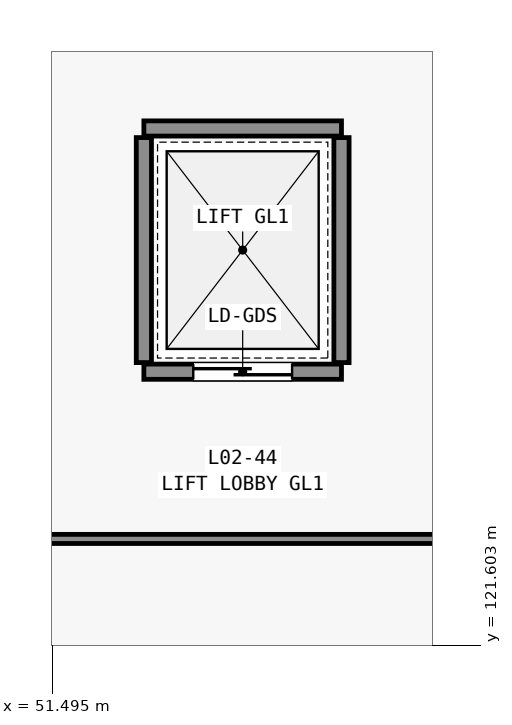
"""IFC4 building model, lengths in metres.
Left out: names, types, materials, properties, quantities, classifications, styles, units other than length and angle.
Written with IfcOpenShell. Run it as: python <this file> out.ifc"""

import sys

from ifc_helpers import new_model, si_unit, direction, frame, frame_2d, origin, place, context, subcontext, project, spatial, rectangle, extrude, element, fill, save


model = new_model("IFC4")
c1 = context("Model", 3, precision=1e-05, world=origin(), true_north=direction((0.0, 1.0)))
c2 = subcontext(c1, "Body", "Model", "MODEL_VIEW")
j1 = project(units=[si_unit("LENGTHUNIT", "METRE"), si_unit("PLANEANGLEUNIT", "RADIAN")], contexts=[c1])
p1 = place(None, origin())
s1 = spatial("IfcSite", under=j1, at=p1, CompositionType="ELEMENT")
p2 = place(p1, origin())
s2 = spatial("IfcBuilding", under=s1, at=p2, CompositionType="ELEMENT")
p3 = place(p2, frame((0.0, 0.0, 11.4)))
s3 = spatial("IfcBuildingStorey", under=s2, at=p3, CompositionType="ELEMENT", Elevation=11.4)
p4 = place(p3, frame((52.7, 125.2, 0.0), z_axis=(0.0, 0.0, 1.0), x_axis=(1.0, 0.0, 0.0)))
e1 = element("IfcWall", 1, at=p4, inside=s3, PredefinedType="STANDARD", context=c2, shape_type="SweptSolid", body=[
    extrude(rectangle(XDim=2.6, YDim=0.2, at=frame_2d((1.3, 0.0))), origin(), (0.0, 0.0, 1.0), 4.45),
])
p5 = place(p4, frame((0.65, 0.0, 0.0)))
e2 = element("IfcOpeningElement", 2, at=p5, cuts=e1, PredefinedType="OPENING", context=c2, shape_type="SweptSolid", body=[
    extrude(rectangle(XDim=1.3, YDim=2.15, at=frame_2d((0.65, 1.075))), frame((0.0, 0.11, 0.0), z_axis=(0.0, -1.0, 0.0), x_axis=(1.0, 0.0, 0.0)), (0.0, 0.0, 1.0), 0.22),
])
p6 = place(p3, frame((52.7, 128.4, 0.0), z_axis=(0.0, 0.0, 1.0), x_axis=(1.0, 0.0, 0.0)))
e3 = element("IfcWall", 3, at=p6, inside=s3, PredefinedType="STANDARD", context=c2, shape_type="SweptSolid", body=[
    extrude(rectangle(XDim=2.6, YDim=0.2, at=frame_2d((1.3, 0.0))), origin(), (0.0, 0.0, 1.0), 4.45),
])
for number, where, z_axis, x_axis in (
    (4, (52.7, 125.32, 0.0), (0.0, 0.0, 1.0), (0.0, 1.0, 0.0)),
    (5, (55.3, 125.32, 0.0), (0.0, 0.0, 1.0), (0.0, 1.0, 0.0)),
):
    element("IfcWall", number, at=place(p3, frame(where, z_axis=z_axis, x_axis=x_axis)), inside=s3, PredefinedType="STANDARD", context=c2, shape_type="SweptSolid", body=[
        extrude(rectangle(XDim=2.96, YDim=0.2, at=frame_2d((1.48, 0.0))), origin(), (0.0, 0.0, 1.0), 4.45),
    ])
p7 = place(p3, frame((41.5, 123.0, 0.0), z_axis=(0.0, 0.0, 1.0), x_axis=(1.0, 0.0, 0.0)))
e6 = element("IfcWall", 6, at=p7, inside=s3, PredefinedType="PARTITIONING", context=c2, shape_type="SweptSolid", body=[
    extrude(rectangle(XDim=35.0, YDim=0.12, at=frame_2d((17.5, 0.0))), origin(), (0.0, 0.0, 1.0), 3.838),
])
p8 = place(p5, origin())
e7 = element("IfcDoor", 7, at=p8, inside=s3, OperationType="SLIDING_TO_LEFT", PredefinedType="DOOR", context=c2, shape_type="SweptSolid", body=[
    extrude(rectangle(XDim=1.3, YDim=2.15, at=frame_2d((0.65, 1.075))), frame((0.0, 0.025, 0.0), z_axis=(0.0, -1.0, 0.0), x_axis=(1.0, 0.0, 0.0)), (0.0, 0.0, 1.0), 0.05),
])
fill(e2, e7)
save(model, sys.argv[1])
